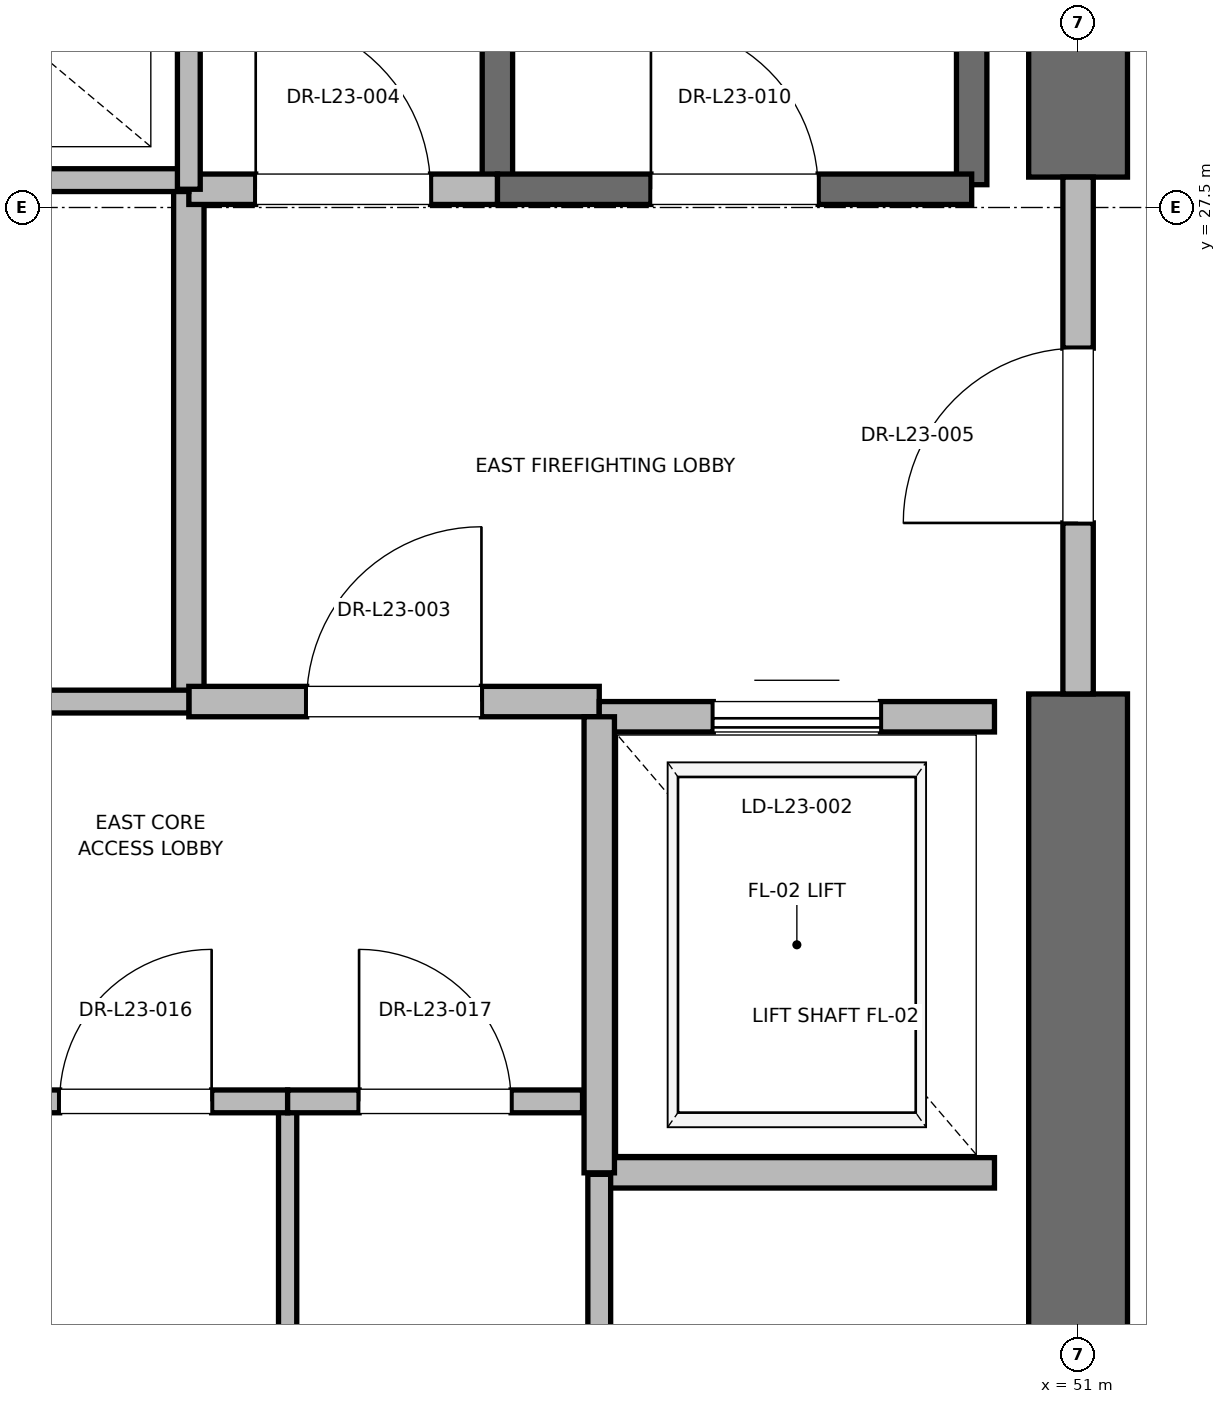
"""IFC4 building model, lengths in metres.
Left out: names, types, materials, properties, quantities, classifications, styles, units other than length and angle.
Written with IfcOpenShell. Run it as: python <this file> out.ifc"""

import sys

from ifc_helpers import new_model, si_unit, direction, frame, frame_2d, origin, place, context, subcontext, project, spatial, rectangle, extrude, element, fill, save


model = new_model("IFC4")
c1 = context("Model", 3, precision=1e-05, world=origin(), true_north=direction((0.0, 1.0)))
c2 = subcontext(c1, "Body", "Model", "MODEL_VIEW")
j1 = project(units=[si_unit("LENGTHUNIT", "METRE"), si_unit("PLANEANGLEUNIT", "RADIAN")], contexts=[c1])
p1 = place(None, origin())
s1 = spatial("IfcSite", under=j1, at=p1, CompositionType="ELEMENT")
p2 = place(p1, origin())
s2 = spatial("IfcBuilding", under=s1, at=p2, CompositionType="ELEMENT")
p3 = place(p2, frame((0.0, 0.0, 99.6)))
s3 = spatial("IfcBuildingStorey", under=s2, at=p3, CompositionType="ELEMENT", Elevation=99.6)
p4 = place(p3, frame((51.0, 18.5, 0.0), z_axis=(0.0, 0.0, 1.0), x_axis=(0.0, 1.0, 0.0)))
e1 = element("IfcWall", 1, at=p4, inside=s3, PredefinedType="SHEAR", context=c2, shape_type="SweptSolid", body=[
    extrude(rectangle(XDim=5.8, YDim=0.65, at=frame_2d((2.9, 0.0))), origin(), (0.0, 0.0, 1.0), 3.76),
])
p5 = place(p3, frame((51.0, 27.7, 0.0), z_axis=(0.0, 0.0, 1.0), x_axis=(0.0, 1.0, 0.0)))
e2 = element("IfcWall", 2, at=p5, inside=s3, PredefinedType="SHEAR", context=c2, shape_type="SweptSolid", body=[
    extrude(rectangle(XDim=8.8, YDim=0.65, at=frame_2d((4.4, 0.0))), origin(), (0.0, 0.0, 1.0), 3.76),
])
p6 = place(p3, frame((50.3, 27.65, 0.0), z_axis=(0.0, 0.0, 1.0), x_axis=(0.0, 1.0, 0.0)))
e3 = element("IfcWall", 3, at=p6, inside=s3, PredefinedType="SOLIDWALL", context=c2, shape_type="SweptSolid", body=[
    extrude(rectangle(XDim=8.15, YDim=0.2, at=frame_2d((4.075, 0.0))), origin(), (0.0, 0.0, 1.0), 3.76),
])
p7 = place(p3, frame((47.18, 27.62, 0.0), z_axis=(0.0, 0.0, 1.0), x_axis=(0.0, 1.0, 0.0)))
e4 = element("IfcWall", 4, at=p7, inside=s3, PredefinedType="SOLIDWALL", context=c2, shape_type="SweptSolid", body=[
    extrude(rectangle(XDim=8.18, YDim=0.2, at=frame_2d((4.09, 0.0))), origin(), (0.0, 0.0, 1.0), 3.76),
])
p8 = place(p3, frame((47.18, 27.62, 0.0), z_axis=(0.0, 0.0, 1.0), x_axis=(1.0, 0.0, 0.0)))
e5 = element("IfcWall", 5, at=p8, inside=s3, PredefinedType="SOLIDWALL", context=c2, shape_type="SweptSolid", body=[
    extrude(rectangle(XDim=3.12, YDim=0.2, at=frame_2d((1.56, 0.0))), origin(), (0.0, 0.0, 1.0), 3.76),
])
p9 = place(p8, frame((1.01, 0.0, 0.0)))
e6 = element("IfcOpeningElement", 6, at=p9, cuts=e5, PredefinedType="OPENING", context=c2, shape_type="SweptSolid", body=[
    extrude(rectangle(XDim=1.1, YDim=2.15, at=frame_2d((0.55, 1.075))), frame((0.0, 0.1, 0.0), z_axis=(0.0, -1.0, 0.0), x_axis=(1.0, 0.0, 0.0)), (0.0, 0.0, 1.0), 0.2),
])
p10 = place(p3, frame((45.15, 24.25, 0.0), z_axis=(0.0, 0.0, 1.0), x_axis=(0.0, 1.0, 0.0)))
e7 = element("IfcWall", 7, at=p10, inside=s3, PredefinedType="PARTITIONING", context=c2, shape_type="SweptSolid", body=[
    extrude(rectangle(XDim=3.37, YDim=0.2, at=frame_2d((1.685, 0.0))), origin(), (0.0, 0.0, 1.0), 3.76),
])
p11 = place(p3, frame((45.15, 24.25, 0.0), z_axis=(0.0, 0.0, 1.0), x_axis=(1.0, 0.0, 0.0)))
e8 = element("IfcWall", 8, at=p11, inside=s3, PredefinedType="PARTITIONING", context=c2, shape_type="SweptSolid", body=[
    extrude(rectangle(XDim=2.7, YDim=0.2, at=frame_2d((1.35, 0.0))), origin(), (0.0, 0.0, 1.0), 3.76),
])
p12 = place(p11, frame((0.775, 0.0, 0.0)))
e9 = element("IfcOpeningElement", 9, at=p12, cuts=e8, PredefinedType="OPENING", context=c2, shape_type="SweptSolid", body=[
    extrude(rectangle(XDim=1.15, YDim=2.2, at=frame_2d((0.575, 1.1))), frame((0.0, 0.1, 0.0), z_axis=(0.0, -1.0, 0.0), x_axis=(1.0, 0.0, 0.0)), (0.0, 0.0, 1.0), 0.2),
])
p13 = place(p3, frame((45.15, 27.62, 0.0), z_axis=(0.0, 0.0, 1.0), x_axis=(1.0, 0.0, 0.0)))
e10 = element("IfcWall", 10, at=p13, inside=s3, PredefinedType="PARTITIONING", context=c2, shape_type="SweptSolid", body=[
    extrude(rectangle(XDim=2.03, YDim=0.2, at=frame_2d((1.015, 0.0))), origin(), (0.0, 0.0, 1.0), 3.76),
])
p14 = place(p13, frame((0.44, 0.0, 0.0)))
e11 = element("IfcOpeningElement", 11, at=p14, cuts=e10, PredefinedType="OPENING", context=c2, shape_type="SweptSolid", body=[
    extrude(rectangle(XDim=1.15, YDim=2.2, at=frame_2d((0.575, 1.1))), frame((0.0, 0.1, 0.0), z_axis=(0.0, -1.0, 0.0), x_axis=(1.0, 0.0, 0.0)), (0.0, 0.0, 1.0), 0.2),
])
p15 = place(p3, frame((51.0, 24.3, 0.0), z_axis=(0.0, 0.0, 1.0), x_axis=(0.0, 1.0, 0.0)))
e12 = element("IfcWall", 12, at=p15, inside=s3, PredefinedType="PARTITIONING", context=c2, shape_type="SweptSolid", body=[
    extrude(rectangle(XDim=3.4, YDim=0.2, at=frame_2d((1.7, 0.0))), origin(), (0.0, 0.0, 1.0), 2.54),
])
p16 = place(p15, frame((1.125, 0.0, 0.0)))
e13 = element("IfcOpeningElement", 13, at=p16, cuts=e12, PredefinedType="OPENING", context=c2, shape_type="SweptSolid", body=[
    extrude(rectangle(XDim=1.15, YDim=2.2, at=frame_2d((0.575, 1.1))), frame((0.0, 0.1, 0.0), z_axis=(0.0, -1.0, 0.0), x_axis=(1.0, 0.0, 0.0)), (0.0, 0.0, 1.0), 0.2),
])
p17 = place(p3, frame((47.85, 21.15, 0.0), z_axis=(0.0, 0.0, 1.0), x_axis=(1.0, 0.0, 0.0)))
e14 = element("IfcWall", 14, at=p17, inside=s3, PredefinedType="SOLIDWALL", context=c2, shape_type="SweptSolid", body=[
    extrude(rectangle(XDim=2.6, YDim=0.2, at=frame_2d((1.3, 0.0))), origin(), (0.0, 0.0, 1.0), 3.76),
])
p18 = place(p3, frame((50.45, 24.15, 0.0), z_axis=(0.0, 0.0, 1.0), x_axis=(-1.0, 0.0, 0.0)))
e15 = element("IfcWall", 15, at=p18, inside=s3, PredefinedType="SOLIDWALL", context=c2, shape_type="SweptSolid", body=[
    extrude(rectangle(XDim=2.6, YDim=0.2, at=frame_2d((1.3, 0.0))), origin(), (0.0, 0.0, 1.0), 2.54),
])
p19 = place(p18, frame((0.75, 0.0, 0.0)))
e16 = element("IfcOpeningElement", 16, at=p19, cuts=e15, PredefinedType="OPENING", context=c2, shape_type="SweptSolid", body=[
    extrude(rectangle(XDim=1.1, YDim=2.2, at=frame_2d((0.55, 1.1))), frame((0.0, 0.1, 0.0), z_axis=(0.0, -1.0, 0.0), x_axis=(1.0, 0.0, 0.0)), (0.0, 0.0, 1.0), 0.2),
])
p20 = place(p3, frame((47.85, 24.15, 0.0), z_axis=(0.0, 0.0, 1.0), x_axis=(0.0, -1.0, 0.0)))
e17 = element("IfcWall", 17, at=p20, inside=s3, PredefinedType="SOLIDWALL", context=c2, shape_type="SweptSolid", body=[
    extrude(rectangle(XDim=3.0, YDim=0.2, at=frame_2d((1.5, 0.0))), origin(), (0.0, 0.0, 1.0), 3.76),
])
p21 = place(p3, frame((41.56, 27.68, 0.0), z_axis=(0.0, 0.0, 1.0), x_axis=(1.0, 0.0, 0.0)))
e18 = element("IfcWall", 18, at=p21, inside=s3, PredefinedType="PARTITIONING", context=c2, shape_type="SweptSolid", body=[
    extrude(rectangle(XDim=3.59, YDim=0.15, at=frame_2d((1.795, 0.0))), origin(), (0.0, 0.0, 1.0), 2.85),
])
p22 = place(p3, frame((47.85, 18.6, 0.0), z_axis=(0.0, 0.0, 1.0), x_axis=(0.0, 1.0, 0.0)))
e19 = element("IfcWall", 19, at=p22, inside=s3, PredefinedType="PARTITIONING", context=c2, shape_type="SweptSolid", body=[
    extrude(rectangle(XDim=2.54, YDim=0.15, at=frame_2d((1.27, 0.0))), origin(), (0.0, 0.0, 1.0), 2.85),
])
p23 = place(p3, frame((45.8, 18.6, 0.0), z_axis=(0.0, 0.0, 1.0), x_axis=(0.0, 1.0, 0.0)))
e20 = element("IfcWall", 20, at=p23, inside=s3, PredefinedType="PARTITIONING", context=c2, shape_type="SweptSolid", body=[
    extrude(rectangle(XDim=3.02, YDim=0.12, at=frame_2d((1.51, 0.0))), origin(), (0.0, 0.0, 1.0), 2.85),
])
p24 = place(p3, frame((43.8, 21.62, 0.0), z_axis=(0.0, 0.0, 1.0), x_axis=(1.0, 0.0, 0.0)))
e21 = element("IfcWall", 21, at=p24, inside=s3, PredefinedType="PARTITIONING", context=c2, shape_type="SweptSolid", body=[
    extrude(rectangle(XDim=2.0, YDim=0.15, at=frame_2d((1.0, 0.0))), origin(), (0.0, 0.0, 1.0), 2.85),
])
p25 = place(p24, frame((0.5, 0.0, 0.0)))
e22 = element("IfcOpeningElement", 22, at=p25, cuts=e21, PredefinedType="OPENING", context=c2, shape_type="SweptSolid", body=[
    extrude(rectangle(XDim=1.0, YDim=2.15, at=frame_2d((0.5, 1.075))), frame((0.0, 0.075, 0.0), z_axis=(0.0, -1.0, 0.0), x_axis=(1.0, 0.0, 0.0)), (0.0, 0.0, 1.0), 0.15),
])
p26 = place(p3, frame((45.8, 21.62, 0.0), z_axis=(0.0, 0.0, 1.0), x_axis=(1.0, 0.0, 0.0)))
e23 = element("IfcWall", 23, at=p26, inside=s3, PredefinedType="PARTITIONING", context=c2, shape_type="SweptSolid", body=[
    extrude(rectangle(XDim=1.94, YDim=0.15, at=frame_2d((0.97, 0.0))), origin(), (0.0, 0.0, 1.0), 2.85),
])
p27 = place(p26, frame((0.47, 0.0, 0.0)))
e24 = element("IfcOpeningElement", 24, at=p27, cuts=e23, PredefinedType="OPENING", context=c2, shape_type="SweptSolid", body=[
    extrude(rectangle(XDim=1.0, YDim=2.15, at=frame_2d((0.5, 1.075))), frame((0.0, 0.075, 0.0), z_axis=(0.0, -1.0, 0.0), x_axis=(1.0, 0.0, 0.0)), (0.0, 0.0, 1.0), 0.15),
])
p28 = place(p3, frame((41.76, 24.25, 0.0), z_axis=(0.0, 0.0, 1.0), x_axis=(1.0, 0.0, 0.0)))
e25 = element("IfcWall", 25, at=p28, inside=s3, PredefinedType="PARTITIONING", context=c2, shape_type="SweptSolid", body=[
    extrude(rectangle(XDim=3.39, YDim=0.15, at=frame_2d((1.695, 0.0))), origin(), (0.0, 0.0, 1.0), 2.85),
])
p29 = place(p28, frame((1.255, 0.0, 0.0)))
e26 = element("IfcOpeningElement", 26, at=p29, cuts=e25, PredefinedType="OPENING", context=c2, shape_type="SweptSolid", body=[
    extrude(rectangle(XDim=0.88, YDim=2.1, at=frame_2d((0.44, 1.05))), frame((0.0, 0.075, 0.0), z_axis=(0.0, -1.0, 0.0), x_axis=(1.0, 0.0, 0.0)), (0.0, 0.0, 1.0), 0.15),
])
p30 = place(p3, frame((45.15, 27.62, 0.0), z_axis=(0.0, 0.0, 1.0), x_axis=(0.0, 1.0, 0.0)))
e27 = element("IfcWall", 27, at=p30, inside=s3, PredefinedType="PARTITIONING", context=c2, shape_type="SweptSolid", body=[
    extrude(rectangle(XDim=3.1, YDim=0.15, at=frame_2d((1.55, 0.0))), origin(), (0.0, 0.0, 1.0), 2.85),
])
p31 = place(p9, origin())
e28 = element("IfcDoor", 28, at=p31, inside=s3, OperationType="SINGLE_SWING_LEFT", PredefinedType="DOOR", context=c2, shape_type="SweptSolid", body=[
    extrude(rectangle(XDim=1.1, YDim=2.15, at=frame_2d((0.55, 1.075))), frame((0.0, 0.025, 0.0), z_axis=(0.0, -1.0, 0.0), x_axis=(1.0, 0.0, 0.0)), (0.0, 0.0, 1.0), 0.05),
])
fill(e6, e28)
p32 = place(p12, origin())
e29 = element("IfcDoor", 29, at=p32, inside=s3, OperationType="SINGLE_SWING_RIGHT", PredefinedType="DOOR", context=c2, shape_type="SweptSolid", body=[
    extrude(rectangle(XDim=1.15, YDim=2.2, at=frame_2d((0.575, 1.1))), frame((0.0, 0.025, 0.0), z_axis=(0.0, -1.0, 0.0), x_axis=(1.0, 0.0, 0.0)), (0.0, 0.0, 1.0), 0.05),
])
fill(e9, e29)
p33 = place(p14, origin())
e30 = element("IfcDoor", 30, at=p33, inside=s3, OperationType="SINGLE_SWING_LEFT", PredefinedType="DOOR", context=c2, shape_type="SweptSolid", body=[
    extrude(rectangle(XDim=1.15, YDim=2.2, at=frame_2d((0.575, 1.1))), frame((0.0, 0.025, 0.0), z_axis=(0.0, -1.0, 0.0), x_axis=(1.0, 0.0, 0.0)), (0.0, 0.0, 1.0), 0.05),
])
fill(e11, e30)
p34 = place(p16, origin())
e31 = element("IfcDoor", 31, at=p34, inside=s3, OperationType="SINGLE_SWING_LEFT", PredefinedType="DOOR", context=c2, shape_type="SweptSolid", body=[
    extrude(rectangle(XDim=1.15, YDim=2.2, at=frame_2d((0.575, 1.1))), frame((0.0, 0.025, 0.0), z_axis=(0.0, -1.0, 0.0), x_axis=(1.0, 0.0, 0.0)), (0.0, 0.0, 1.0), 0.05),
])
fill(e13, e31)
p35 = place(p19, origin())
e32 = element("IfcDoor", 32, at=p35, inside=s3, OperationType="SLIDING_TO_RIGHT", PredefinedType="DOOR", context=c2, shape_type="SweptSolid", body=[
    extrude(rectangle(XDim=1.1, YDim=2.2, at=frame_2d((0.55, 1.1))), frame((0.0, 0.025, 0.0), z_axis=(0.0, -1.0, 0.0), x_axis=(1.0, 0.0, 0.0)), (0.0, 0.0, 1.0), 0.05),
])
fill(e16, e32)
p36 = place(p25, origin())
e33 = element("IfcDoor", 33, at=p36, inside=s3, OperationType="SINGLE_SWING_RIGHT", PredefinedType="DOOR", context=c2, shape_type="SweptSolid", body=[
    extrude(rectangle(XDim=1.0, YDim=2.15, at=frame_2d((0.5, 1.075))), frame((0.0, 0.025, 0.0), z_axis=(0.0, -1.0, 0.0), x_axis=(1.0, 0.0, 0.0)), (0.0, 0.0, 1.0), 0.05),
])
fill(e22, e33)
p37 = place(p27, origin())
e34 = element("IfcDoor", 34, at=p37, inside=s3, OperationType="SINGLE_SWING_LEFT", PredefinedType="DOOR", context=c2, shape_type="SweptSolid", body=[
    extrude(rectangle(XDim=1.0, YDim=2.15, at=frame_2d((0.5, 1.075))), frame((0.0, 0.025, 0.0), z_axis=(0.0, -1.0, 0.0), x_axis=(1.0, 0.0, 0.0)), (0.0, 0.0, 1.0), 0.05),
])
fill(e24, e34)
save(model, sys.argv[1])
